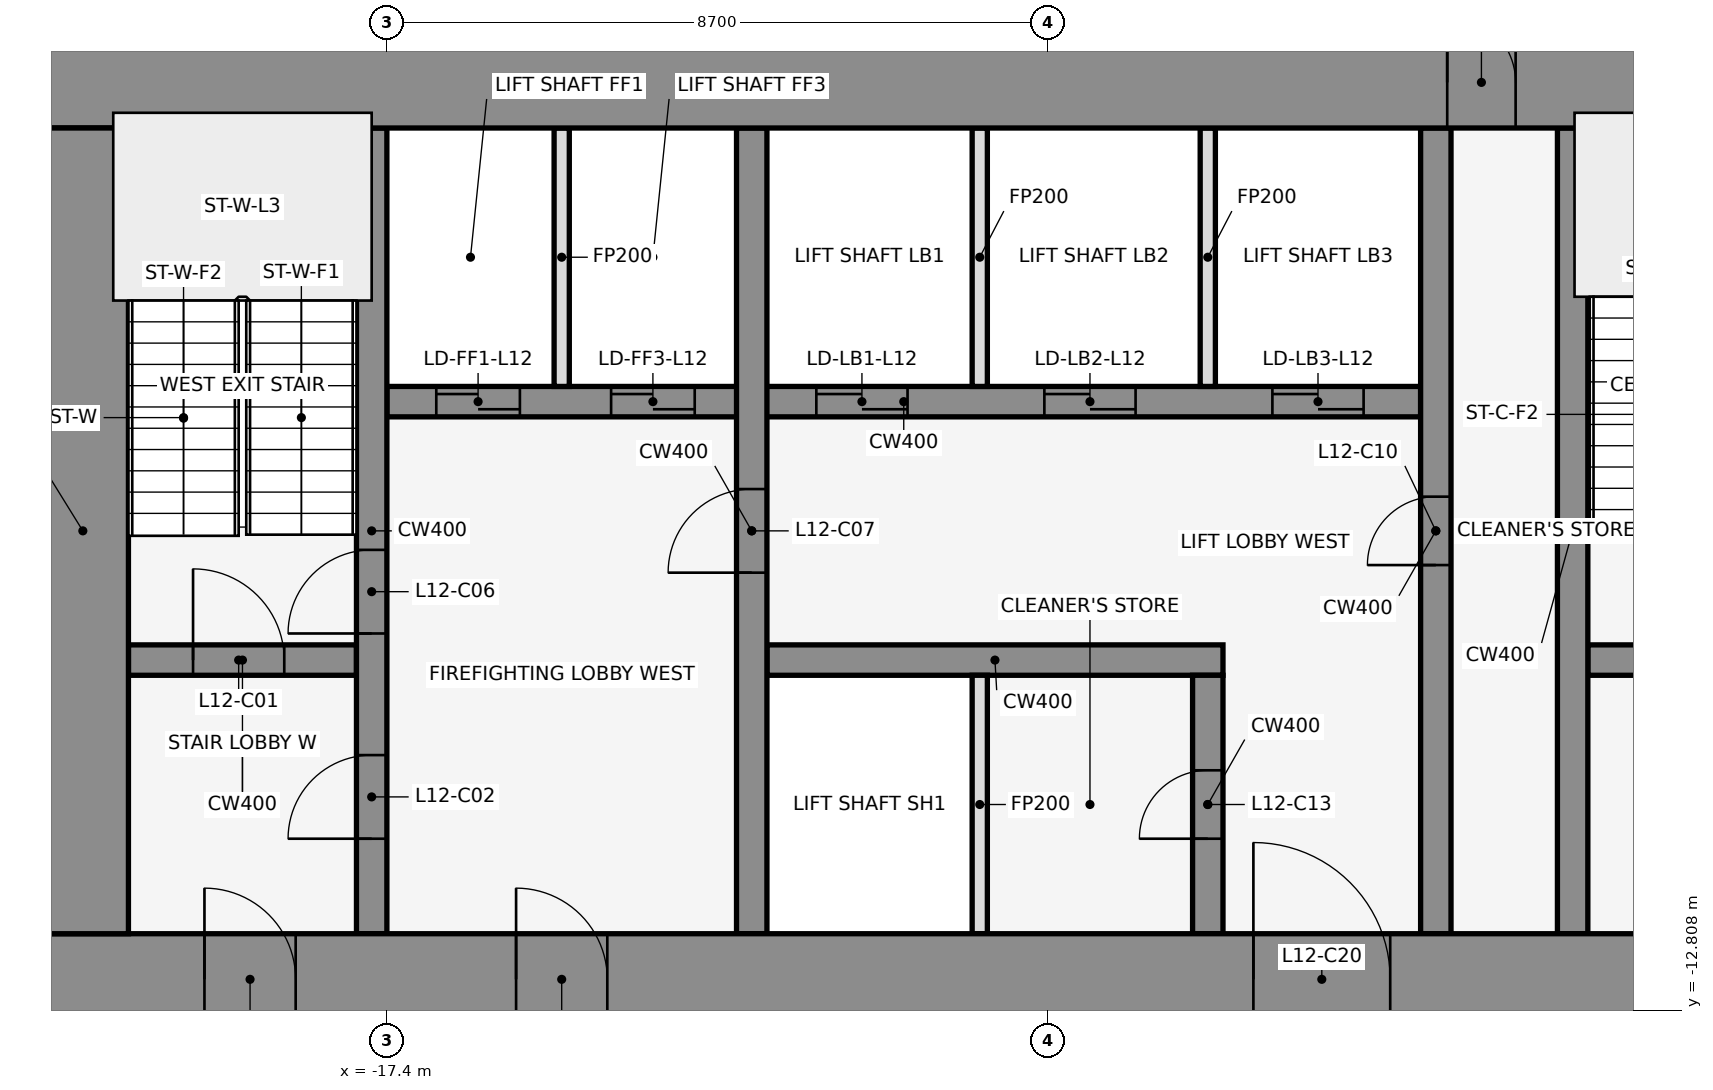
"""IFC4 building model, lengths in metres.
Left out: names, types, materials, properties, quantities, classifications, styles, units other than length and angle.
Written with IfcOpenShell. Run it as: python <this file> out.ifc"""

import sys

from ifc_helpers import new_model, si_unit, direction, frame, frame_2d, origin, place, context, subcontext, project, spatial, rectangle, extrude, element, fill, save


model = new_model("IFC4")
c1 = context("Model", 3, precision=1e-05, world=origin(), true_north=direction((0.0, 1.0)))
c2 = subcontext(c1, "Body", "Model", "MODEL_VIEW")
j1 = project(units=[si_unit("LENGTHUNIT", "METRE"), si_unit("PLANEANGLEUNIT", "RADIAN")], contexts=[c1])
p1 = place(None, origin())
s1 = spatial("IfcSite", under=j1, at=p1, CompositionType="ELEMENT")
p2 = place(p1, origin())
s2 = spatial("IfcBuilding", under=s1, at=p2, CompositionType="ELEMENT")
p3 = place(p2, frame((0.0, 0.0, 62.0)))
s3 = spatial("IfcBuildingStorey", under=s2, at=p3, CompositionType="ELEMENT", Elevation=62.0)
for number, where, z_axis, x_axis in (
    (1, (-0.068, -0.105, 0.0), (0.0, 0.0, 1.0), (-0.84, 0.543, 0.0)),
    (2, (-14.599, 1.08, 0.0), (0.0, 0.0, 1.0), (-0.84, -0.543, 0.0)),
):
    element("IfcWall", number, at=place(p3, frame(where, z_axis=z_axis, x_axis=x_axis)), inside=s3, PredefinedType="STANDARD", context=c2, shape_type="SweptSolid", body=[
        extrude(rectangle(XDim=2.183, YDim=0.25, at=frame_2d((1.091, 0.0))), origin(), (0.0, 0.0, 1.0), 4.35),
    ])
p4 = place(p3, frame((-20.8, -8.2, 0.0), z_axis=(0.0, 0.0, 1.0), x_axis=(1.0, 0.0, 0.0)))
e3 = element("IfcWall", 3, at=p4, inside=s3, PredefinedType="SHEAR", context=c2, shape_type="SweptSolid", body=[
    extrude(rectangle(XDim=3.0, YDim=0.4, at=frame_2d((1.5, 0.0))), origin(), (0.0, 0.0, 1.0), 4.5),
])
p5 = place(p4, frame((0.85, 0.0, 0.0)))
e4 = element("IfcOpeningElement", 4, at=p5, cuts=e3, PredefinedType="OPENING", context=c2, shape_type="SweptSolid", body=[
    extrude(rectangle(XDim=1.2, YDim=2.1, at=frame_2d((0.6, 1.05))), frame((0.0, 0.212, 0.0), z_axis=(0.0, -1.0, 0.0), x_axis=(1.0, 0.0, 0.0)), (0.0, 0.0, 1.0), 0.424),
])
p6 = place(p3, frame((-12.4, -8.2, 0.0), z_axis=(0.0, 0.0, 1.0), x_axis=(1.0, 0.0, 0.0)))
e5 = element("IfcWall", 5, at=p6, inside=s3, PredefinedType="SHEAR", context=c2, shape_type="SweptSolid", body=[
    extrude(rectangle(XDim=6.0, YDim=0.4, at=frame_2d((3.0, 0.0))), origin(), (0.0, 0.0, 1.0), 4.5),
])
p7 = place(p3, frame((-1.6, -8.2, 0.0), z_axis=(0.0, 0.0, 1.0), x_axis=(1.0, 0.0, 0.0)))
e6 = element("IfcWall", 6, at=p7, inside=s3, PredefinedType="SHEAR", context=c2, shape_type="SweptSolid", body=[
    extrude(rectangle(XDim=3.2, YDim=0.4, at=frame_2d((1.6, 0.0))), origin(), (0.0, 0.0, 1.0), 4.5),
])
p8 = place(p7, frame((1.05, 0.0, 0.0)))
e7 = element("IfcOpeningElement", 7, at=p8, cuts=e6, PredefinedType="OPENING", context=c2, shape_type="SweptSolid", body=[
    extrude(rectangle(XDim=1.2, YDim=2.1, at=frame_2d((0.6, 1.05))), frame((0.0, 0.212, 0.0), z_axis=(0.0, -1.0, 0.0), x_axis=(1.0, 0.0, 0.0)), (0.0, 0.0, 1.0), 0.424),
])
p9 = place(p3, frame((-17.4, -4.8, 0.0), z_axis=(0.0, 0.0, 1.0), x_axis=(1.0, 0.0, 0.0)))
e8 = element("IfcWall", 8, at=p9, inside=s3, PredefinedType="SHEAR", context=c2, shape_type="SweptSolid", body=[
    extrude(rectangle(XDim=13.6, YDim=0.4, at=frame_2d((6.8, 0.0))), origin(), (0.0, 0.0, 1.0), 4.5),
])
p10 = place(p9, frame((0.65, 0.0, 0.0)))
e9 = element("IfcOpeningElement", 9, at=p10, cuts=e8, PredefinedType="OPENING", context=c2, shape_type="SweptSolid", body=[
    extrude(rectangle(XDim=1.1, YDim=2.1, at=frame_2d((0.55, 1.05))), frame((0.0, 0.212, 0.0), z_axis=(0.0, -1.0, 0.0), x_axis=(1.0, 0.0, 0.0)), (0.0, 0.0, 1.0), 0.424),
])
p11 = place(p9, frame((2.95, 0.0, 0.0)))
e10 = element("IfcOpeningElement", 10, at=p11, cuts=e8, PredefinedType="OPENING", context=c2, shape_type="SweptSolid", body=[
    extrude(rectangle(XDim=1.1, YDim=2.1, at=frame_2d((0.55, 1.05))), frame((0.0, 0.212, 0.0), z_axis=(0.0, -1.0, 0.0), x_axis=(1.0, 0.0, 0.0)), (0.0, 0.0, 1.0), 0.424),
])
p12 = place(p9, frame((5.65, 0.0, 0.0)))
e11 = element("IfcOpeningElement", 11, at=p12, cuts=e8, PredefinedType="OPENING", context=c2, shape_type="SweptSolid", body=[
    extrude(rectangle(XDim=1.2, YDim=2.1, at=frame_2d((0.6, 1.05))), frame((0.0, 0.212, 0.0), z_axis=(0.0, -1.0, 0.0), x_axis=(1.0, 0.0, 0.0)), (0.0, 0.0, 1.0), 0.424),
])
p13 = place(p9, frame((8.65, 0.0, 0.0)))
e12 = element("IfcOpeningElement", 12, at=p13, cuts=e8, PredefinedType="OPENING", context=c2, shape_type="SweptSolid", body=[
    extrude(rectangle(XDim=1.2, YDim=2.1, at=frame_2d((0.6, 1.05))), frame((0.0, 0.212, 0.0), z_axis=(0.0, -1.0, 0.0), x_axis=(1.0, 0.0, 0.0)), (0.0, 0.0, 1.0), 0.424),
])
p14 = place(p9, frame((11.65, 0.0, 0.0)))
e13 = element("IfcOpeningElement", 13, at=p14, cuts=e8, PredefinedType="OPENING", context=c2, shape_type="SweptSolid", body=[
    extrude(rectangle(XDim=1.2, YDim=2.1, at=frame_2d((0.6, 1.05))), frame((0.0, 0.212, 0.0), z_axis=(0.0, -1.0, 0.0), x_axis=(1.0, 0.0, 0.0)), (0.0, 0.0, 1.0), 0.424),
])
p15 = place(p3, frame((-17.6, -11.8, 0.0), z_axis=(0.0, 0.0, 1.0), x_axis=(0.0, 1.0, 0.0)))
e14 = element("IfcWall", 14, at=p15, inside=s3, PredefinedType="SHEAR", context=c2, shape_type="SweptSolid", body=[
    extrude(rectangle(XDim=10.6, YDim=0.4, at=frame_2d((5.3, 0.0))), origin(), (0.0, 0.0, 1.0), 4.5),
])
p16 = place(p15, frame((1.25, 0.0, 0.0)))
e15 = element("IfcOpeningElement", 15, at=p16, cuts=e14, PredefinedType="OPENING", context=c2, shape_type="SweptSolid", body=[
    extrude(rectangle(XDim=1.1, YDim=2.1, at=frame_2d((0.55, 1.05))), frame((0.0, 0.212, 0.0), z_axis=(0.0, -1.0, 0.0), x_axis=(1.0, 0.0, 0.0)), (0.0, 0.0, 1.0), 0.424),
])
p17 = place(p15, frame((3.95, 0.0, 0.0)))
e16 = element("IfcOpeningElement", 16, at=p17, cuts=e14, PredefinedType="OPENING", context=c2, shape_type="SweptSolid", body=[
    extrude(rectangle(XDim=1.1, YDim=2.1, at=frame_2d((0.55, 1.05))), frame((0.0, 0.212, 0.0), z_axis=(0.0, -1.0, 0.0), x_axis=(1.0, 0.0, 0.0)), (0.0, 0.0, 1.0), 0.424),
])
p18 = place(p3, frame((-15.1, -4.6, 0.0), z_axis=(0.0, 0.0, 1.0), x_axis=(0.0, 1.0, 0.0)))
e17 = element("IfcWall", 17, at=p18, inside=s3, PredefinedType="PARTITIONING", context=c2, shape_type="SweptSolid", body=[
    extrude(rectangle(XDim=3.4, YDim=0.2, at=frame_2d((1.7, 0.0))), origin(), (0.0, 0.0, 1.0), 3.418),
])
p19 = place(p3, frame((-12.6, -11.8, 0.0), z_axis=(0.0, 0.0, 1.0), x_axis=(0.0, 1.0, 0.0)))
e18 = element("IfcWall", 18, at=p19, inside=s3, PredefinedType="SHEAR", context=c2, shape_type="SweptSolid", body=[
    extrude(rectangle(XDim=10.6, YDim=0.4, at=frame_2d((5.3, 0.0))), origin(), (0.0, 0.0, 1.0), 4.5),
])
p20 = place(p19, frame((4.75, 0.0, 0.0)))
e19 = element("IfcOpeningElement", 19, at=p20, cuts=e18, PredefinedType="OPENING", context=c2, shape_type="SweptSolid", body=[
    extrude(rectangle(XDim=1.1, YDim=2.1, at=frame_2d((0.55, 1.05))), frame((0.0, 0.212, 0.0), z_axis=(0.0, -1.0, 0.0), x_axis=(1.0, 0.0, 0.0)), (0.0, 0.0, 1.0), 0.424),
])
for number, where, z_axis, x_axis in (
    (20, (-9.6, -11.8, 0.0), (0.0, 0.0, 1.0), (0.0, 1.0, 0.0)),
    (21, (-9.6, -4.6, 0.0), (0.0, 0.0, 1.0), (0.0, 1.0, 0.0)),
):
    element("IfcWall", number, at=place(p3, frame(where, z_axis=z_axis, x_axis=x_axis)), inside=s3, PredefinedType="PARTITIONING", context=c2, shape_type="SweptSolid", body=[
        extrude(rectangle(XDim=3.4, YDim=0.2, at=frame_2d((1.7, 0.0))), origin(), (0.0, 0.0, 1.0), 3.418),
    ])
p21 = place(p3, frame((-6.6, -11.8, 0.0), z_axis=(0.0, 0.0, 1.0), x_axis=(0.0, 1.0, 0.0)))
e22 = element("IfcWall", 22, at=p21, inside=s3, PredefinedType="SHEAR", context=c2, shape_type="SweptSolid", body=[
    extrude(rectangle(XDim=3.4, YDim=0.4, at=frame_2d((1.7, 0.0))), origin(), (0.0, 0.0, 1.0), 4.5),
])
p22 = place(p21, frame((1.25, 0.0, 0.0)))
e23 = element("IfcOpeningElement", 23, at=p22, cuts=e22, PredefinedType="OPENING", context=c2, shape_type="SweptSolid", body=[
    extrude(rectangle(XDim=0.9, YDim=2.1, at=frame_2d((0.45, 1.05))), frame((0.0, 0.212, 0.0), z_axis=(0.0, -1.0, 0.0), x_axis=(1.0, 0.0, 0.0)), (0.0, 0.0, 1.0), 0.424),
])
p23 = place(p3, frame((-6.6, -4.6, 0.0), z_axis=(0.0, 0.0, 1.0), x_axis=(0.0, 1.0, 0.0)))
e24 = element("IfcWall", 24, at=p23, inside=s3, PredefinedType="PARTITIONING", context=c2, shape_type="SweptSolid", body=[
    extrude(rectangle(XDim=3.4, YDim=0.2, at=frame_2d((1.7, 0.0))), origin(), (0.0, 0.0, 1.0), 3.418),
])
p24 = place(p3, frame((-3.6, -11.8, 0.0), z_axis=(0.0, 0.0, 1.0), x_axis=(0.0, 1.0, 0.0)))
e25 = element("IfcWall", 25, at=p24, inside=s3, PredefinedType="SHEAR", context=c2, shape_type="SweptSolid", body=[
    extrude(rectangle(XDim=10.6, YDim=0.4, at=frame_2d((5.3, 0.0))), origin(), (0.0, 0.0, 1.0), 4.5),
])
p25 = place(p24, frame((4.85, 0.0, 0.0)))
e26 = element("IfcOpeningElement", 26, at=p25, cuts=e25, PredefinedType="OPENING", context=c2, shape_type="SweptSolid", body=[
    extrude(rectangle(XDim=0.9, YDim=2.1, at=frame_2d((0.45, 1.05))), frame((0.0, 0.212, 0.0), z_axis=(0.0, -1.0, 0.0), x_axis=(1.0, 0.0, 0.0)), (0.0, 0.0, 1.0), 0.424),
])
p26 = place(p3, frame((-1.8, -11.8, 0.0), z_axis=(0.0, 0.0, 1.0), x_axis=(0.0, 1.0, 0.0)))
e27 = element("IfcWall", 27, at=p26, inside=s3, PredefinedType="SHEAR", context=c2, shape_type="SweptSolid", body=[
    extrude(rectangle(XDim=10.6, YDim=0.4, at=frame_2d((5.3, 0.0))), origin(), (0.0, 0.0, 1.0), 4.5),
])
p27 = place(p3, frame((-22.0, -0.6, 0.0), z_axis=(0.0, 0.0, 1.0), x_axis=(1.0, 0.0, 0.0)))
e28 = element("IfcWall", 28, at=p27, inside=s3, PredefinedType="SHEAR", context=c2, shape_type="SweptSolid", body=[
    extrude(rectangle(XDim=44.0, YDim=1.2, at=frame_2d((22.0, 0.0))), origin(), (0.0, 0.0, 1.0), 4.5),
])
p28 = place(p27, frame((18.55, 0.0, 0.0)))
e29 = element("IfcOpeningElement", 29, at=p28, cuts=e28, PredefinedType="OPENING", context=c2, shape_type="SweptSolid", body=[
    extrude(rectangle(XDim=0.9, YDim=2.1, at=frame_2d((0.45, 1.05))), frame((0.0, 0.612, 0.0), z_axis=(0.0, -1.0, 0.0), x_axis=(1.0, 0.0, 0.0)), (0.0, 0.0, 1.0), 1.224),
])
p29 = place(p27, frame((24.55, 0.0, 0.0)))
e30 = element("IfcOpeningElement", 30, at=p29, cuts=e28, PredefinedType="OPENING", context=c2, shape_type="SweptSolid", body=[
    extrude(rectangle(XDim=0.9, YDim=2.1, at=frame_2d((0.45, 1.05))), frame((0.0, 0.612, 0.0), z_axis=(0.0, -1.0, 0.0), x_axis=(1.0, 0.0, 0.0)), (0.0, 0.0, 1.0), 1.224),
])
p30 = place(p3, frame((-22.0, -12.4, 0.0), z_axis=(0.0, 0.0, 1.0), x_axis=(1.0, 0.0, 0.0)))
e31 = element("IfcWall", 31, at=p30, inside=s3, PredefinedType="SHEAR", context=c2, shape_type="SweptSolid", body=[
    extrude(rectangle(XDim=44.0, YDim=1.2, at=frame_2d((22.0, 0.0))), origin(), (0.0, 0.0, 1.0), 4.5),
])
p31 = place(p30, frame((2.2, 0.0, 0.0)))
e32 = element("IfcOpeningElement", 32, at=p31, cuts=e31, PredefinedType="OPENING", context=c2, shape_type="SweptSolid", body=[
    extrude(rectangle(XDim=1.2, YDim=2.1, at=frame_2d((0.6, 1.05))), frame((0.0, 0.612, 0.0), z_axis=(0.0, -1.0, 0.0), x_axis=(1.0, 0.0, 0.0)), (0.0, 0.0, 1.0), 1.224),
])
p32 = place(p30, frame((21.4, 0.0, 0.0)))
e33 = element("IfcOpeningElement", 33, at=p32, cuts=e31, PredefinedType="OPENING", context=c2, shape_type="SweptSolid", body=[
    extrude(rectangle(XDim=1.2, YDim=2.1, at=frame_2d((0.6, 1.05))), frame((0.0, 0.612, 0.0), z_axis=(0.0, -1.0, 0.0), x_axis=(1.0, 0.0, 0.0)), (0.0, 0.0, 1.0), 1.224),
])
p33 = place(p30, frame((40.6, 0.0, 0.0)))
e34 = element("IfcOpeningElement", 34, at=p33, cuts=e31, PredefinedType="OPENING", context=c2, shape_type="SweptSolid", body=[
    extrude(rectangle(XDim=1.2, YDim=2.1, at=frame_2d((0.6, 1.05))), frame((0.0, 0.612, 0.0), z_axis=(0.0, -1.0, 0.0), x_axis=(1.0, 0.0, 0.0)), (0.0, 0.0, 1.0), 1.224),
])
p34 = place(p30, frame((16.0, 0.0, 0.0)))
e35 = element("IfcOpeningElement", 35, at=p34, cuts=e31, PredefinedType="OPENING", context=c2, shape_type="SweptSolid", body=[
    extrude(rectangle(XDim=1.8, YDim=2.1, at=frame_2d((0.9, 1.05))), frame((0.0, 0.612, 0.0), z_axis=(0.0, -1.0, 0.0), x_axis=(1.0, 0.0, 0.0)), (0.0, 0.0, 1.0), 1.224),
])
p35 = place(p30, frame((6.3, 0.0, 0.0)))
e36 = element("IfcOpeningElement", 36, at=p35, cuts=e31, PredefinedType="OPENING", context=c2, shape_type="SweptSolid", body=[
    extrude(rectangle(XDim=1.2, YDim=2.1, at=frame_2d((0.6, 1.05))), frame((0.0, 0.612, 0.0), z_axis=(0.0, -1.0, 0.0), x_axis=(1.0, 0.0, 0.0)), (0.0, 0.0, 1.0), 1.224),
])
p36 = place(p30, frame((26.2, 0.0, 0.0)))
e37 = element("IfcOpeningElement", 37, at=p36, cuts=e31, PredefinedType="OPENING", context=c2, shape_type="SweptSolid", body=[
    extrude(rectangle(XDim=1.8, YDim=2.1, at=frame_2d((0.9, 1.05))), frame((0.0, 0.612, 0.0), z_axis=(0.0, -1.0, 0.0), x_axis=(1.0, 0.0, 0.0)), (0.0, 0.0, 1.0), 1.224),
])
p37 = place(p30, frame((36.5, 0.0, 0.0)))
e38 = element("IfcOpeningElement", 38, at=p37, cuts=e31, PredefinedType="OPENING", context=c2, shape_type="SweptSolid", body=[
    extrude(rectangle(XDim=1.2, YDim=2.1, at=frame_2d((0.6, 1.05))), frame((0.0, 0.612, 0.0), z_axis=(0.0, -1.0, 0.0), x_axis=(1.0, 0.0, 0.0)), (0.0, 0.0, 1.0), 1.224),
])
p38 = place(p3, frame((-21.4, -11.8, 0.0), z_axis=(0.0, 0.0, 1.0), x_axis=(0.0, 1.0, 0.0)))
e39 = element("IfcWall", 39, at=p38, inside=s3, PredefinedType="SHEAR", context=c2, shape_type="SweptSolid", body=[
    extrude(rectangle(XDim=10.6, YDim=1.2, at=frame_2d((5.3, 0.0))), origin(), (0.0, 0.0, 1.0), 4.5),
])
p39 = place(p5, origin())
e40 = element("IfcDoor", 40, at=p39, inside=s3, OperationType="SINGLE_SWING_LEFT", PredefinedType="DOOR", context=c2, shape_type="SweptSolid", body=[
    extrude(rectangle(XDim=1.2, YDim=2.1, at=frame_2d((0.6, 1.05))), frame((0.0, 0.025, 0.0), z_axis=(0.0, -1.0, 0.0), x_axis=(1.0, 0.0, 0.0)), (0.0, 0.0, 1.0), 0.05),
])
fill(e4, e40)
p40 = place(p16, frame((1.1, 0.0, 0.0), z_axis=(0.0, 0.0, 1.0), x_axis=(-1.0, 0.0, 0.0)))
e41 = element("IfcDoor", 41, at=p40, inside=s3, OperationType="SINGLE_SWING_LEFT", PredefinedType="DOOR", context=c2, shape_type="SweptSolid", body=[
    extrude(rectangle(XDim=1.1, YDim=2.1, at=frame_2d((0.55, 1.05))), frame((0.0, 0.025, 0.0), z_axis=(0.0, -1.0, 0.0), x_axis=(1.0, 0.0, 0.0)), (0.0, 0.0, 1.0), 0.05),
])
fill(e15, e41)
p41 = place(p10, origin())
e42 = element("IfcDoor", 42, at=p41, inside=s3, OperationType="DOUBLE_DOOR_SLIDING", PredefinedType="DOOR", context=c2, shape_type="SweptSolid", body=[
    extrude(rectangle(XDim=1.1, YDim=2.1, at=frame_2d((0.55, 1.05))), frame((0.0, 0.025, 0.0), z_axis=(0.0, -1.0, 0.0), x_axis=(1.0, 0.0, 0.0)), (0.0, 0.0, 1.0), 0.05),
])
fill(e9, e42)
p42 = place(p11, origin())
e43 = element("IfcDoor", 43, at=p42, inside=s3, OperationType="DOUBLE_DOOR_SLIDING", PredefinedType="DOOR", context=c2, shape_type="SweptSolid", body=[
    extrude(rectangle(XDim=1.1, YDim=2.1, at=frame_2d((0.55, 1.05))), frame((0.0, 0.025, 0.0), z_axis=(0.0, -1.0, 0.0), x_axis=(1.0, 0.0, 0.0)), (0.0, 0.0, 1.0), 0.05),
])
fill(e10, e43)
p43 = place(p12, origin())
e44 = element("IfcDoor", 44, at=p43, inside=s3, OperationType="DOUBLE_DOOR_SLIDING", PredefinedType="DOOR", context=c2, shape_type="SweptSolid", body=[
    extrude(rectangle(XDim=1.2, YDim=2.1, at=frame_2d((0.6, 1.05))), frame((0.0, 0.025, 0.0), z_axis=(0.0, -1.0, 0.0), x_axis=(1.0, 0.0, 0.0)), (0.0, 0.0, 1.0), 0.05),
])
fill(e11, e44)
p44 = place(p13, origin())
e45 = element("IfcDoor", 45, at=p44, inside=s3, OperationType="DOUBLE_DOOR_SLIDING", PredefinedType="DOOR", context=c2, shape_type="SweptSolid", body=[
    extrude(rectangle(XDim=1.2, YDim=2.1, at=frame_2d((0.6, 1.05))), frame((0.0, 0.025, 0.0), z_axis=(0.0, -1.0, 0.0), x_axis=(1.0, 0.0, 0.0)), (0.0, 0.0, 1.0), 0.05),
])
fill(e12, e45)
p45 = place(p14, origin())
e46 = element("IfcDoor", 46, at=p45, inside=s3, OperationType="DOUBLE_DOOR_SLIDING", PredefinedType="DOOR", context=c2, shape_type="SweptSolid", body=[
    extrude(rectangle(XDim=1.2, YDim=2.1, at=frame_2d((0.6, 1.05))), frame((0.0, 0.025, 0.0), z_axis=(0.0, -1.0, 0.0), x_axis=(1.0, 0.0, 0.0)), (0.0, 0.0, 1.0), 0.05),
])
fill(e13, e46)
p46 = place(p17, frame((1.1, 0.0, 0.0), z_axis=(0.0, 0.0, 1.0), x_axis=(-1.0, 0.0, 0.0)))
e47 = element("IfcDoor", 47, at=p46, inside=s3, OperationType="SINGLE_SWING_LEFT", PredefinedType="DOOR", context=c2, shape_type="SweptSolid", body=[
    extrude(rectangle(XDim=1.1, YDim=2.1, at=frame_2d((0.55, 1.05))), frame((0.0, 0.025, 0.0), z_axis=(0.0, -1.0, 0.0), x_axis=(1.0, 0.0, 0.0)), (0.0, 0.0, 1.0), 0.05),
])
fill(e16, e47)
p47 = place(p20, origin())
e48 = element("IfcDoor", 48, at=p47, inside=s3, OperationType="SINGLE_SWING_LEFT", PredefinedType="DOOR", context=c2, shape_type="SweptSolid", body=[
    extrude(rectangle(XDim=1.1, YDim=2.1, at=frame_2d((0.55, 1.05))), frame((0.0, 0.025, 0.0), z_axis=(0.0, -1.0, 0.0), x_axis=(1.0, 0.0, 0.0)), (0.0, 0.0, 1.0), 0.05),
])
fill(e19, e48)
p48 = place(p25, frame((0.9, 0.0, 0.0), z_axis=(0.0, 0.0, 1.0), x_axis=(-1.0, 0.0, 0.0)))
e49 = element("IfcDoor", 49, at=p48, inside=s3, OperationType="SINGLE_SWING_LEFT", PredefinedType="DOOR", context=c2, shape_type="SweptSolid", body=[
    extrude(rectangle(XDim=0.9, YDim=2.1, at=frame_2d((0.45, 1.05))), frame((0.0, 0.025, 0.0), z_axis=(0.0, -1.0, 0.0), x_axis=(1.0, 0.0, 0.0)), (0.0, 0.0, 1.0), 0.05),
])
fill(e26, e49)
p49 = place(p22, origin())
e50 = element("IfcDoor", 50, at=p49, inside=s3, OperationType="SINGLE_SWING_LEFT", PredefinedType="DOOR", context=c2, shape_type="SweptSolid", body=[
    extrude(rectangle(XDim=0.9, YDim=2.1, at=frame_2d((0.45, 1.05))), frame((0.0, 0.025, 0.0), z_axis=(0.0, -1.0, 0.0), x_axis=(1.0, 0.0, 0.0)), (0.0, 0.0, 1.0), 0.05),
])
fill(e23, e50)
p50 = place(p28, origin())
e51 = element("IfcDoor", 51, at=p50, inside=s3, OperationType="SINGLE_SWING_LEFT", PredefinedType="DOOR", context=c2, shape_type="SweptSolid", body=[
    extrude(rectangle(XDim=0.9, YDim=2.1, at=frame_2d((0.45, 1.05))), frame((0.0, 0.025, 0.0), z_axis=(0.0, -1.0, 0.0), x_axis=(1.0, 0.0, 0.0)), (0.0, 0.0, 1.0), 0.05),
])
fill(e29, e51)
p51 = place(p31, frame((1.2, 0.0, 0.0), z_axis=(0.0, 0.0, 1.0), x_axis=(-1.0, 0.0, 0.0)))
e52 = element("IfcDoor", 52, at=p51, inside=s3, OperationType="SINGLE_SWING_RIGHT", PredefinedType="DOOR", context=c2, shape_type="SweptSolid", body=[
    extrude(rectangle(XDim=1.2, YDim=2.1, at=frame_2d((0.6, 1.05))), frame((0.0, 0.025, 0.0), z_axis=(0.0, -1.0, 0.0), x_axis=(1.0, 0.0, 0.0)), (0.0, 0.0, 1.0), 0.05),
])
fill(e32, e52)
p52 = place(p34, origin())
e53 = element("IfcDoor", 53, at=p52, inside=s3, OperationType="SINGLE_SWING_LEFT", PredefinedType="DOOR", context=c2, shape_type="SweptSolid", body=[
    extrude(rectangle(XDim=1.8, YDim=2.1, at=frame_2d((0.9, 1.05))), frame((0.0, 0.025, 0.0), z_axis=(0.0, -1.0, 0.0), x_axis=(1.0, 0.0, 0.0)), (0.0, 0.0, 1.0), 0.05),
])
fill(e35, e53)
p53 = place(p35, frame((1.2, 0.0, 0.0), z_axis=(0.0, 0.0, 1.0), x_axis=(-1.0, 0.0, 0.0)))
e54 = element("IfcDoor", 54, at=p53, inside=s3, OperationType="SINGLE_SWING_RIGHT", PredefinedType="DOOR", context=c2, shape_type="SweptSolid", body=[
    extrude(rectangle(XDim=1.2, YDim=2.1, at=frame_2d((0.6, 1.05))), frame((0.0, 0.025, 0.0), z_axis=(0.0, -1.0, 0.0), x_axis=(1.0, 0.0, 0.0)), (0.0, 0.0, 1.0), 0.05),
])
fill(e36, e54)
save(model, sys.argv[1])
